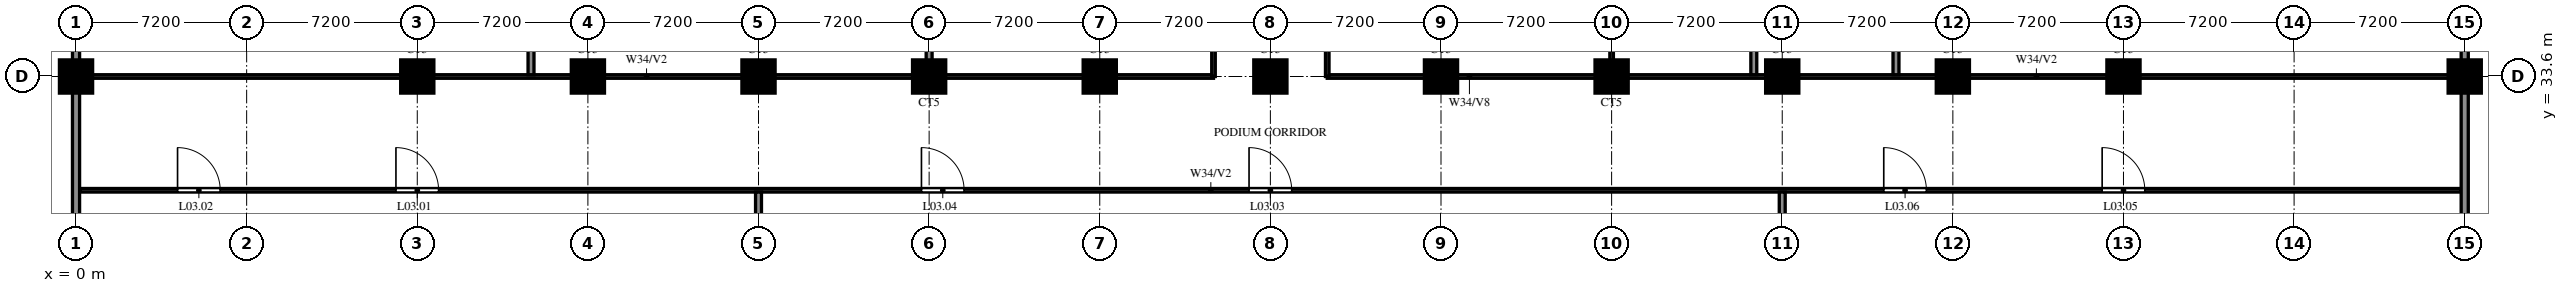
"""IFC4 building model, lengths in metres.
Left out: names, types, materials, properties, quantities, classifications, styles, units other than length and angle.
Written with IfcOpenShell. Run it as: python <this file> out.ifc"""

import sys

from ifc_helpers import new_model, si_unit, direction, frame, frame_2d, origin, origin_2d, place, context, subcontext, project, spatial, rectangle, circle, extrude, source, transform, mapped, element, fill, save


model = new_model("IFC4")
c1 = context("Model", 3, precision=1e-05, world=origin(), true_north=direction((0.0, 1.0)))
c2 = subcontext(c1, "Body", "Model", "MODEL_VIEW")
j1 = project(units=[si_unit("LENGTHUNIT", "METRE"), si_unit("PLANEANGLEUNIT", "RADIAN")], contexts=[c1])
p1 = place(None, origin())
s1 = spatial("IfcSite", under=j1, at=p1, CompositionType="ELEMENT")
p2 = place(p1, origin())
s2 = spatial("IfcBuilding", under=s1, at=p2, CompositionType="ELEMENT")
p3 = place(p2, frame((0.0, 0.0, 17.4)))
s3 = spatial("IfcBuildingStorey", under=s2, at=p3, CompositionType="ELEMENT", Elevation=17.4)
m1 = source(origin(), c2, "Body", "SweptSolid", [
    extrude(circle(Radius=0.7, at=origin_2d()), origin(), (0.0, 0.0, 1.0), 3.8),
])
for number, where, z_axis, x_axis in (
    (1, (0.0, 33.6, 0.0), (0.0, 0.0, 1.0), (1.0, 0.0, 0.0)),
    (2, (14.4, 33.6, 0.0), (0.0, 0.0, 1.0), (1.0, 0.0, 0.0)),
    (3, (21.6, 33.6, 0.0), (0.0, 0.0, 1.0), (1.0, 0.0, 0.0)),
    (4, (28.8, 33.6, 0.0), (0.0, 0.0, 1.0), (1.0, 0.0, 0.0)),
    (5, (36.0, 33.6, 0.0), (0.0, 0.0, 1.0), (1.0, 0.0, 0.0)),
    (6, (43.2, 33.6, 0.0), (0.0, 0.0, 1.0), (1.0, 0.0, 0.0)),
    (7, (50.4, 33.6, 0.0), (0.0, 0.0, 1.0), (1.0, 0.0, 0.0)),
    (8, (57.6, 33.6, 0.0), (0.0, 0.0, 1.0), (1.0, 0.0, 0.0)),
    (9, (64.8, 33.6, 0.0), (0.0, 0.0, 1.0), (1.0, 0.0, 0.0)),
    (10, (72.0, 33.6, 0.0), (0.0, 0.0, 1.0), (1.0, 0.0, 0.0)),
    (11, (79.2, 33.6, 0.0), (0.0, 0.0, 1.0), (1.0, 0.0, 0.0)),
    (12, (86.4, 33.6, 0.0), (0.0, 0.0, 1.0), (1.0, 0.0, 0.0)),
    (13, (100.8, 33.6, 0.0), (0.0, 0.0, 1.0), (1.0, 0.0, 0.0)),
):
    element("IfcColumn", number, at=place(p3, frame(where, z_axis=z_axis, x_axis=x_axis)), inside=s3, PredefinedType="COLUMN", context=c2, shape_type="MappedRepresentation", body=[
        mapped(m1, transform((0.0, 0.0, 0.0))),
    ])
p4 = place(p3, frame((0.15, 28.8, 0.0), z_axis=(0.0, 0.0, 1.0), x_axis=(1.0, 0.0, 0.0)))
e14 = element("IfcWall", 14, at=p4, inside=s3, PredefinedType="PARTITIONING", context=c2, shape_type="SweptSolid", body=[
    extrude(rectangle(XDim=100.5, YDim=0.15, at=frame_2d((50.25, 0.0))), origin(), (0.0, 0.0, 1.0), 2.6),
])
p5 = place(p4, frame((13.35, 0.0, 0.0)))
e15 = element("IfcOpeningElement", 15, at=p5, cuts=e14, PredefinedType="OPENING", context=c2, shape_type="SweptSolid", body=[
    extrude(rectangle(XDim=1.8, YDim=2.1, at=frame_2d((0.9, 1.05))), frame((0.0, 0.085, 0.0), z_axis=(0.0, -1.0, 0.0), x_axis=(1.0, 0.0, 0.0)), (0.0, 0.0, 1.0), 0.17),
])
p6 = place(p4, frame((4.134, 0.0, 0.0)))
e16 = element("IfcOpeningElement", 16, at=p6, cuts=e14, PredefinedType="OPENING", context=c2, shape_type="SweptSolid", body=[
    extrude(rectangle(XDim=1.8, YDim=2.1, at=frame_2d((0.9, 1.05))), frame((0.0, 0.085, 0.0), z_axis=(0.0, -1.0, 0.0), x_axis=(1.0, 0.0, 0.0)), (0.0, 0.0, 1.0), 0.17),
])
p7 = place(p4, frame((49.35, 0.0, 0.0)))
e17 = element("IfcOpeningElement", 17, at=p7, cuts=e14, PredefinedType="OPENING", context=c2, shape_type="SweptSolid", body=[
    extrude(rectangle(XDim=1.8, YDim=2.1, at=frame_2d((0.9, 1.05))), frame((0.0, 0.085, 0.0), z_axis=(0.0, -1.0, 0.0), x_axis=(1.0, 0.0, 0.0)), (0.0, 0.0, 1.0), 0.17),
])
p8 = place(p4, frame((35.526, 0.0, 0.0)))
e18 = element("IfcOpeningElement", 18, at=p8, cuts=e14, PredefinedType="OPENING", context=c2, shape_type="SweptSolid", body=[
    extrude(rectangle(XDim=1.8, YDim=2.1, at=frame_2d((0.9, 1.05))), frame((0.0, 0.085, 0.0), z_axis=(0.0, -1.0, 0.0), x_axis=(1.0, 0.0, 0.0)), (0.0, 0.0, 1.0), 0.17),
])
p9 = place(p4, frame((85.35, 0.0, 0.0)))
e19 = element("IfcOpeningElement", 19, at=p9, cuts=e14, PredefinedType="OPENING", context=c2, shape_type="SweptSolid", body=[
    extrude(rectangle(XDim=1.8, YDim=2.1, at=frame_2d((0.9, 1.05))), frame((0.0, 0.085, 0.0), z_axis=(0.0, -1.0, 0.0), x_axis=(1.0, 0.0, 0.0)), (0.0, 0.0, 1.0), 0.17),
])
p10 = place(p4, frame((76.134, 0.0, 0.0)))
e20 = element("IfcOpeningElement", 20, at=p10, cuts=e14, PredefinedType="OPENING", context=c2, shape_type="SweptSolid", body=[
    extrude(rectangle(XDim=1.8, YDim=2.1, at=frame_2d((0.9, 1.05))), frame((0.0, 0.085, 0.0), z_axis=(0.0, -1.0, 0.0), x_axis=(1.0, 0.0, 0.0)), (0.0, 0.0, 1.0), 0.17),
])
p11 = place(p3, frame((0.15, 33.6, 0.0), z_axis=(0.0, 0.0, 1.0), x_axis=(1.0, 0.0, 0.0)))
e21 = element("IfcWall", 21, at=p11, inside=s3, PredefinedType="PARTITIONING", context=c2, shape_type="SweptSolid", body=[
    extrude(rectangle(XDim=47.85, YDim=0.15, at=frame_2d((23.925, 0.0))), origin(), (0.0, 0.0, 1.0), 2.6),
])
p12 = place(p3, frame((64.8, 33.6, 0.0), z_axis=(0.0, 0.0, 1.0), x_axis=(1.0, 0.0, 0.0)))
e22 = element("IfcWall", 22, at=p12, inside=s3, PredefinedType="PARTITIONING", context=c2, shape_type="SweptSolid", body=[
    extrude(rectangle(XDim=35.85, YDim=0.15, at=frame_2d((17.925, 0.0))), origin(), (0.0, 0.0, 1.0), 2.6),
])
p13 = place(p3, frame((52.8, 33.6, 0.0), z_axis=(0.0, 0.0, 1.0), x_axis=(1.0, 0.0, 0.0)))
e23 = element("IfcWall", 23, at=p13, inside=s3, PredefinedType="PARTITIONING", context=c2, shape_type="SweptSolid", body=[
    extrude(rectangle(XDim=12.0, YDim=0.15, at=frame_2d((6.0, 0.0))), origin(), (0.0, 0.0, 1.0), 2.9),
])
p14 = place(p3, frame((0.0, 9.6, 0.0), z_axis=(0.0, 0.0, 1.0), x_axis=(0.0, 1.0, 0.0)))
e24 = element("IfcWall", 24, at=p14, inside=s3, PredefinedType="SOLIDWALL", context=c2, shape_type="SweptSolid", body=[
    extrude(rectangle(XDim=33.3, YDim=0.3, at=frame_2d((16.65, 0.0))), origin(), (0.0, 0.0, 1.0), 3.8),
])
p15 = place(p14, frame((1.05, 0.0, 0.6)))
e25 = element("IfcOpeningElement", 25, at=p15, cuts=e24, PredefinedType="OPENING", context=c2, shape_type="SweptSolid", body=[
    extrude(rectangle(XDim=1.8, YDim=2.4, at=frame_2d((0.9, 1.2))), frame((0.0, 0.16, 0.0), z_axis=(0.0, -1.0, 0.0), x_axis=(1.0, 0.0, 0.0)), (0.0, 0.0, 1.0), 0.32),
])
p16 = place(p14, frame((4.65, 0.0, 0.6)))
e26 = element("IfcOpeningElement", 26, at=p16, cuts=e24, PredefinedType="OPENING", context=c2, shape_type="SweptSolid", body=[
    extrude(rectangle(XDim=1.8, YDim=2.4, at=frame_2d((0.9, 1.2))), frame((0.0, 0.16, 0.0), z_axis=(0.0, -1.0, 0.0), x_axis=(1.0, 0.0, 0.0)), (0.0, 0.0, 1.0), 0.32),
])
p17 = place(p14, frame((11.85, 0.0, 0.6)))
e27 = element("IfcOpeningElement", 27, at=p17, cuts=e24, PredefinedType="OPENING", context=c2, shape_type="SweptSolid", body=[
    extrude(rectangle(XDim=1.8, YDim=2.4, at=frame_2d((0.9, 1.2))), frame((0.0, 0.16, 0.0), z_axis=(0.0, -1.0, 0.0), x_axis=(1.0, 0.0, 0.0)), (0.0, 0.0, 1.0), 0.32),
])
p18 = place(p14, frame((15.45, 0.0, 0.6)))
e28 = element("IfcOpeningElement", 28, at=p18, cuts=e24, PredefinedType="OPENING", context=c2, shape_type="SweptSolid", body=[
    extrude(rectangle(XDim=1.8, YDim=2.4, at=frame_2d((0.9, 1.2))), frame((0.0, 0.16, 0.0), z_axis=(0.0, -1.0, 0.0), x_axis=(1.0, 0.0, 0.0)), (0.0, 0.0, 1.0), 0.32),
])
p19 = place(p14, frame((26.25, 0.0, 0.6)))
e29 = element("IfcOpeningElement", 29, at=p19, cuts=e24, PredefinedType="OPENING", context=c2, shape_type="SweptSolid", body=[
    extrude(rectangle(XDim=1.8, YDim=2.4, at=frame_2d((0.9, 1.2))), frame((0.0, 0.16, 0.0), z_axis=(0.0, -1.0, 0.0), x_axis=(1.0, 0.0, 0.0)), (0.0, 0.0, 1.0), 0.32),
])
p20 = place(p14, frame((29.85, 0.0, 0.6)))
e30 = element("IfcOpeningElement", 30, at=p20, cuts=e24, PredefinedType="OPENING", context=c2, shape_type="SweptSolid", body=[
    extrude(rectangle(XDim=1.8, YDim=2.4, at=frame_2d((0.9, 1.2))), frame((0.0, 0.16, 0.0), z_axis=(0.0, -1.0, 0.0), x_axis=(1.0, 0.0, 0.0)), (0.0, 0.0, 1.0), 0.32),
])
p21 = place(p3, frame((19.2, 33.675, 0.0), z_axis=(0.0, 0.0, 1.0), x_axis=(0.0, 1.0, 0.0)))
e31 = element("IfcWall", 31, at=p21, inside=s3, PredefinedType="SOLIDWALL", context=c2, shape_type="SweptSolid", body=[
    extrude(rectangle(XDim=15.75, YDim=0.25, at=frame_2d((7.875, 0.0))), origin(), (0.0, 0.0, 1.0), 2.9),
])
p22 = place(p3, frame((28.8, 9.75, 0.0), z_axis=(0.0, 0.0, 1.0), x_axis=(0.0, 1.0, 0.0)))
e32 = element("IfcWall", 32, at=p22, inside=s3, PredefinedType="SOLIDWALL", context=c2, shape_type="SweptSolid", body=[
    extrude(rectangle(XDim=18.975, YDim=0.25, at=frame_2d((9.488, 0.0))), origin(), (0.0, 0.0, 1.0), 2.6),
])
p23 = place(p3, frame((36.0, 33.675, 0.0), z_axis=(0.0, 0.0, 1.0), x_axis=(0.0, 1.0, 0.0)))
e33 = element("IfcWall", 33, at=p23, inside=s3, PredefinedType="SOLIDWALL", context=c2, shape_type="SweptSolid", body=[
    extrude(rectangle(XDim=15.75, YDim=0.25, at=frame_2d((7.875, 0.0))), origin(), (0.0, 0.0, 1.0), 2.6),
])
for number, where, z_axis, x_axis in (
    (34, (48.0, 33.6, 0.0), (0.0, 0.0, 1.0), (0.0, 1.0, 0.0)),
    (35, (52.8, 33.6, 0.0), (0.0, 0.0, 1.0), (0.0, 1.0, 0.0)),
):
    element("IfcWall", number, at=place(p3, frame(where, z_axis=z_axis, x_axis=x_axis)), inside=s3, PredefinedType="PARTITIONING", context=c2, shape_type="SweptSolid", body=[
        extrude(rectangle(XDim=15.9, YDim=0.15, at=frame_2d((7.95, 0.0))), origin(), (0.0, 0.0, 1.0), 2.9),
    ])
p24 = place(p3, frame((64.8, 33.6, 0.0), z_axis=(0.0, 0.0, 1.0), x_axis=(0.0, 1.0, 0.0)))
e36 = element("IfcWall", 36, at=p24, inside=s3, PredefinedType="PARTITIONING", context=c2, shape_type="SweptSolid", body=[
    extrude(rectangle(XDim=15.9, YDim=0.15, at=frame_2d((7.95, 0.0))), origin(), (0.0, 0.0, 1.0), 2.6),
])
p25 = place(p3, frame((70.8, 33.675, 0.0), z_axis=(0.0, 0.0, 1.0), x_axis=(0.0, 1.0, 0.0)))
e37 = element("IfcWall", 37, at=p25, inside=s3, PredefinedType="SOLIDWALL", context=c2, shape_type="SweptSolid", body=[
    extrude(rectangle(XDim=15.75, YDim=0.25, at=frame_2d((7.875, 0.0))), origin(), (0.0, 0.0, 1.0), 2.9),
])
p26 = place(p3, frame((72.0, 9.75, 0.0), z_axis=(0.0, 0.0, 1.0), x_axis=(0.0, 1.0, 0.0)))
e38 = element("IfcWall", 38, at=p26, inside=s3, PredefinedType="SOLIDWALL", context=c2, shape_type="SweptSolid", body=[
    extrude(rectangle(XDim=18.975, YDim=0.25, at=frame_2d((9.488, 0.0))), origin(), (0.0, 0.0, 1.0), 2.6),
])
p27 = place(p3, frame((76.8, 33.675, 0.0), z_axis=(0.0, 0.0, 1.0), x_axis=(0.0, 1.0, 0.0)))
e39 = element("IfcWall", 39, at=p27, inside=s3, PredefinedType="SOLIDWALL", context=c2, shape_type="SweptSolid", body=[
    extrude(rectangle(XDim=15.75, YDim=0.25, at=frame_2d((7.875, 0.0))), origin(), (0.0, 0.0, 1.0), 2.9),
])
p28 = place(p3, frame((100.8, 9.6, 0.0), z_axis=(0.0, 0.0, 1.0), x_axis=(0.0, 1.0, 0.0)))
e40 = element("IfcWall", 40, at=p28, inside=s3, PredefinedType="SOLIDWALL", context=c2, shape_type="SweptSolid", body=[
    extrude(rectangle(XDim=33.3, YDim=0.3, at=frame_2d((16.65, 0.0))), origin(), (0.0, 0.0, 1.0), 3.8),
])
p29 = place(p28, frame((1.05, 0.0, 0.6)))
e41 = element("IfcOpeningElement", 41, at=p29, cuts=e40, PredefinedType="OPENING", context=c2, shape_type="SweptSolid", body=[
    extrude(rectangle(XDim=1.8, YDim=2.4, at=frame_2d((0.9, 1.2))), frame((0.0, 0.16, 0.0), z_axis=(0.0, -1.0, 0.0), x_axis=(1.0, 0.0, 0.0)), (0.0, 0.0, 1.0), 0.32),
])
p30 = place(p28, frame((4.65, 0.0, 0.6)))
e42 = element("IfcOpeningElement", 42, at=p30, cuts=e40, PredefinedType="OPENING", context=c2, shape_type="SweptSolid", body=[
    extrude(rectangle(XDim=1.8, YDim=2.4, at=frame_2d((0.9, 1.2))), frame((0.0, 0.16, 0.0), z_axis=(0.0, -1.0, 0.0), x_axis=(1.0, 0.0, 0.0)), (0.0, 0.0, 1.0), 0.32),
])
p31 = place(p28, frame((11.85, 0.0, 0.6)))
e43 = element("IfcOpeningElement", 43, at=p31, cuts=e40, PredefinedType="OPENING", context=c2, shape_type="SweptSolid", body=[
    extrude(rectangle(XDim=1.8, YDim=2.4, at=frame_2d((0.9, 1.2))), frame((0.0, 0.16, 0.0), z_axis=(0.0, -1.0, 0.0), x_axis=(1.0, 0.0, 0.0)), (0.0, 0.0, 1.0), 0.32),
])
p32 = place(p28, frame((15.45, 0.0, 0.6)))
e44 = element("IfcOpeningElement", 44, at=p32, cuts=e40, PredefinedType="OPENING", context=c2, shape_type="SweptSolid", body=[
    extrude(rectangle(XDim=1.8, YDim=2.4, at=frame_2d((0.9, 1.2))), frame((0.0, 0.16, 0.0), z_axis=(0.0, -1.0, 0.0), x_axis=(1.0, 0.0, 0.0)), (0.0, 0.0, 1.0), 0.32),
])
p33 = place(p28, frame((26.25, 0.0, 0.6)))
e45 = element("IfcOpeningElement", 45, at=p33, cuts=e40, PredefinedType="OPENING", context=c2, shape_type="SweptSolid", body=[
    extrude(rectangle(XDim=1.8, YDim=2.4, at=frame_2d((0.9, 1.2))), frame((0.0, 0.16, 0.0), z_axis=(0.0, -1.0, 0.0), x_axis=(1.0, 0.0, 0.0)), (0.0, 0.0, 1.0), 0.32),
])
p34 = place(p28, frame((29.85, 0.0, 0.6)))
e46 = element("IfcOpeningElement", 46, at=p34, cuts=e40, PredefinedType="OPENING", context=c2, shape_type="SweptSolid", body=[
    extrude(rectangle(XDim=1.8, YDim=2.4, at=frame_2d((0.9, 1.2))), frame((0.0, 0.16, 0.0), z_axis=(0.0, -1.0, 0.0), x_axis=(1.0, 0.0, 0.0)), (0.0, 0.0, 1.0), 0.32),
])
p35 = place(p5, origin())
e47 = element("IfcDoor", 47, at=p35, inside=s3, OperationType="DOUBLE_DOOR_SINGLE_SWING", PredefinedType="DOOR", context=c2, shape_type="SweptSolid", body=[
    extrude(rectangle(XDim=1.8, YDim=2.1, at=frame_2d((0.9, 1.05))), frame((0.0, 0.025, 0.0), z_axis=(0.0, -1.0, 0.0), x_axis=(1.0, 0.0, 0.0)), (0.0, 0.0, 1.0), 0.05),
])
fill(e15, e47)
p36 = place(p6, origin())
e48 = element("IfcDoor", 48, at=p36, inside=s3, OperationType="DOUBLE_DOOR_SINGLE_SWING", PredefinedType="DOOR", context=c2, shape_type="SweptSolid", body=[
    extrude(rectangle(XDim=1.8, YDim=2.1, at=frame_2d((0.9, 1.05))), frame((0.0, 0.025, 0.0), z_axis=(0.0, -1.0, 0.0), x_axis=(1.0, 0.0, 0.0)), (0.0, 0.0, 1.0), 0.05),
])
fill(e16, e48)
p37 = place(p7, origin())
e49 = element("IfcDoor", 49, at=p37, inside=s3, OperationType="DOUBLE_DOOR_SINGLE_SWING", PredefinedType="DOOR", context=c2, shape_type="SweptSolid", body=[
    extrude(rectangle(XDim=1.8, YDim=2.1, at=frame_2d((0.9, 1.05))), frame((0.0, 0.025, 0.0), z_axis=(0.0, -1.0, 0.0), x_axis=(1.0, 0.0, 0.0)), (0.0, 0.0, 1.0), 0.05),
])
fill(e17, e49)
p38 = place(p8, origin())
e50 = element("IfcDoor", 50, at=p38, inside=s3, OperationType="DOUBLE_DOOR_SINGLE_SWING", PredefinedType="DOOR", context=c2, shape_type="SweptSolid", body=[
    extrude(rectangle(XDim=1.8, YDim=2.1, at=frame_2d((0.9, 1.05))), frame((0.0, 0.025, 0.0), z_axis=(0.0, -1.0, 0.0), x_axis=(1.0, 0.0, 0.0)), (0.0, 0.0, 1.0), 0.05),
])
fill(e18, e50)
p39 = place(p9, origin())
e51 = element("IfcDoor", 51, at=p39, inside=s3, OperationType="DOUBLE_DOOR_SINGLE_SWING", PredefinedType="DOOR", context=c2, shape_type="SweptSolid", body=[
    extrude(rectangle(XDim=1.8, YDim=2.1, at=frame_2d((0.9, 1.05))), frame((0.0, 0.025, 0.0), z_axis=(0.0, -1.0, 0.0), x_axis=(1.0, 0.0, 0.0)), (0.0, 0.0, 1.0), 0.05),
])
fill(e19, e51)
p40 = place(p10, origin())
e52 = element("IfcDoor", 52, at=p40, inside=s3, OperationType="DOUBLE_DOOR_SINGLE_SWING", PredefinedType="DOOR", context=c2, shape_type="SweptSolid", body=[
    extrude(rectangle(XDim=1.8, YDim=2.1, at=frame_2d((0.9, 1.05))), frame((0.0, 0.025, 0.0), z_axis=(0.0, -1.0, 0.0), x_axis=(1.0, 0.0, 0.0)), (0.0, 0.0, 1.0), 0.05),
])
fill(e20, e52)
save(model, sys.argv[1])
